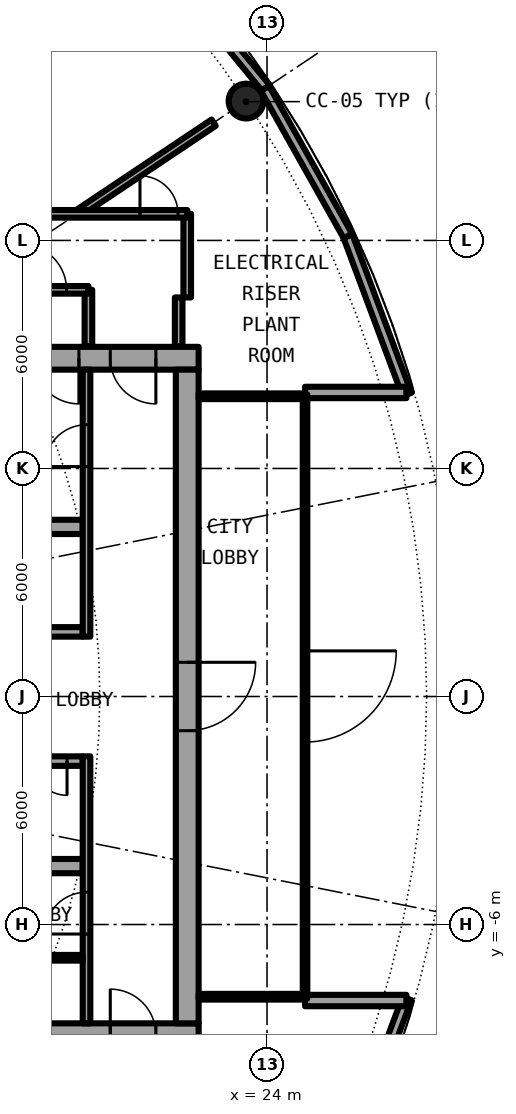
"""IFC4 building model, lengths in metres.
Left out: names, types, materials, properties, quantities, classifications, styles, units other than length and angle.
Written with IfcOpenShell. Run it as: python <this file> out.ifc"""

import sys

from ifc_helpers import new_model, si_unit, direction, frame, frame_2d, origin, origin_2d, place, context, subcontext, project, spatial, rectangle, hollow_circle, extrude, element, fill, save


model = new_model("IFC4")
c1 = context("Model", 3, precision=1e-05, world=origin(), true_north=direction((0.0, 1.0)))
c2 = subcontext(c1, "Body", "Model", "MODEL_VIEW")
j1 = project(units=[si_unit("LENGTHUNIT", "METRE"), si_unit("PLANEANGLEUNIT", "RADIAN")], contexts=[c1])
p1 = place(None, origin())
s1 = spatial("IfcSite", under=j1, at=p1, CompositionType="ELEMENT")
p2 = place(p1, origin())
s2 = spatial("IfcBuilding", under=s1, at=p2, CompositionType="ELEMENT")
p3 = place(p2, frame((0.0, 0.0, 103.25)))
s3 = spatial("IfcBuildingStorey", under=s2, at=p3, CompositionType="ELEMENT", Elevation=103.25)
p4 = place(p3, frame((23.448, 15.667, 0.0), z_axis=(0.0, 0.0, 1.0), x_axis=(1.0, 0.0, 0.0)))
e1 = element("IfcColumn", 1, at=p4, inside=s3, PredefinedType="COLUMN", context=c2, shape_type="SweptSolid", body=[
    extrude(hollow_circle(Radius=0.457, WallThickness=0.04, at=origin_2d()), origin(), (0.0, 0.0, 1.0), 4.2),
])
p5 = place(p3, frame((23.967, 16.014, 0.0), z_axis=(0.0, 0.0, 1.0), x_axis=(-0.634403999748, 0.773001659186, 0.0)))
e2 = element("IfcWall", 2, at=p5, inside=s3, PredefinedType="SOLIDWALL", context=c2, shape_type="SweptSolid", body=[
    extrude(rectangle(XDim=5.651, YDim=0.25, at=frame_2d((2.825, 0.0))), origin(), (0.0, 0.0, 1.0), 3.85),
])
p6 = place(p3, frame((27.682, 7.945, 0.0), z_axis=(0.0, 0.0, 1.0), x_axis=(-0.349247811493, 0.937030397675, 0.0)))
e3 = element("IfcWall", 3, at=p6, inside=s3, PredefinedType="SOLIDWALL", context=c2, shape_type="SweptSolid", body=[
    extrude(rectangle(XDim=4.452, YDim=0.25, at=frame_2d((2.226, 0.0))), origin(), (0.0, 0.0, 1.0), 3.85),
])
p7 = place(p3, frame((26.127, 12.117, 0.0), z_axis=(0.0, 0.0, 1.0), x_axis=(-0.489696356642, 0.871893042919, 0.0)))
e4 = element("IfcWall", 4, at=p7, inside=s3, PredefinedType="SOLIDWALL", context=c2, shape_type="SweptSolid", body=[
    extrude(rectangle(XDim=4.454, YDim=0.25, at=frame_2d((2.227, 0.0))), origin(), (0.0, 0.0, 1.0), 3.85),
])
p8 = place(p3, frame((26.127, -12.117, 0.0), z_axis=(0.0, 0.0, 1.0), x_axis=(0.349247811493, 0.937030397675, 0.0)))
e5 = element("IfcWall", 5, at=p8, inside=s3, PredefinedType="SOLIDWALL", context=c2, shape_type="SweptSolid", body=[
    extrude(rectangle(XDim=4.452, YDim=0.25, at=frame_2d((2.226, 0.0))), origin(), (0.0, 0.0, 1.0), 3.85),
])
for number, where, z_axis, x_axis in (
    (6, (25.0, 8.0, 0.0), (0.0, 0.0, 1.0), (1.0, 0.0, 0.0)),
    (7, (25.0, -8.0, 0.0), (0.0, 0.0, 1.0), (1.0, 0.0, 0.0)),
):
    element("IfcWall", number, at=place(p3, frame(where, z_axis=z_axis, x_axis=x_axis)), inside=s3, PredefinedType="SOLIDWALL", context=c2, shape_type="SweptSolid", body=[
        extrude(rectangle(XDim=2.667, YDim=0.3, at=frame_2d((1.333, 0.0))), origin(), (0.0, 0.0, 1.0), 3.85),
    ])
p9 = place(p3, frame((22.2, 8.9, 0.0), z_axis=(0.0, 0.0, 1.0), x_axis=(-1.0, 0.0, 0.0)))
e8 = element("IfcWall", 8, at=p9, inside=s3, PredefinedType="SHEAR", context=c2, shape_type="SweptSolid", body=[
    extrude(rectangle(XDim=13.8, YDim=0.6, at=frame_2d((6.9, 0.0))), origin(), (0.0, 0.0, 1.0), 4.2),
])
p10 = place(p9, frame((1.125, 0.0, 0.0)))
e9 = element("IfcOpeningElement", 9, at=p10, cuts=e8, PredefinedType="OPENING", context=c2, shape_type="SweptSolid", body=[
    extrude(rectangle(XDim=1.2, YDim=2.3, at=frame_2d((0.6, 1.15))), frame((0.0, 0.31, 0.0), z_axis=(0.0, -1.0, 0.0), x_axis=(1.0, 0.0, 0.0)), (0.0, 0.0, 1.0), 0.62),
])
p11 = place(p9, frame((3.15, 0.0, 0.0)))
e10 = element("IfcOpeningElement", 10, at=p11, cuts=e8, PredefinedType="OPENING", context=c2, shape_type="SweptSolid", body=[
    extrude(rectangle(XDim=1.2, YDim=2.3, at=frame_2d((0.6, 1.15))), frame((0.0, 0.31, 0.0), z_axis=(0.0, -1.0, 0.0), x_axis=(1.0, 0.0, 0.0)), (0.0, 0.0, 1.0), 0.62),
])
p12 = place(p3, frame((8.4, -8.9, 0.0), z_axis=(0.0, 0.0, 1.0), x_axis=(1.0, 0.0, 0.0)))
e11 = element("IfcWall", 11, at=p12, inside=s3, PredefinedType="SHEAR", context=c2, shape_type="SweptSolid", body=[
    extrude(rectangle(XDim=13.8, YDim=0.6, at=frame_2d((6.9, 0.0))), origin(), (0.0, 0.0, 1.0), 4.2),
])
p13 = place(p12, frame((11.475, 0.0, 0.0)))
e12 = element("IfcOpeningElement", 12, at=p13, cuts=e11, PredefinedType="OPENING", context=c2, shape_type="SweptSolid", body=[
    extrude(rectangle(XDim=1.2, YDim=2.3, at=frame_2d((0.6, 1.15))), frame((0.0, 0.31, 0.0), z_axis=(0.0, -1.0, 0.0), x_axis=(1.0, 0.0, 0.0)), (0.0, 0.0, 1.0), 0.62),
])
p14 = place(p3, frame((21.9, 8.6, 0.0), z_axis=(0.0, 0.0, 1.0), x_axis=(0.0, -1.0, 0.0)))
e13 = element("IfcWall", 13, at=p14, inside=s3, PredefinedType="SHEAR", context=c2, shape_type="SweptSolid", body=[
    extrude(rectangle(XDim=17.2, YDim=0.6, at=frame_2d((8.6, 0.0))), origin(), (0.0, 0.0, 1.0), 4.2),
])
p15 = place(p14, frame((7.7, 0.0, 0.0)))
e14 = element("IfcOpeningElement", 14, at=p15, cuts=e13, PredefinedType="OPENING", context=c2, shape_type="SweptSolid", body=[
    extrude(rectangle(XDim=1.8, YDim=2.3, at=frame_2d((0.9, 1.15))), frame((0.0, 0.31, 0.0), z_axis=(0.0, -1.0, 0.0), x_axis=(1.0, 0.0, 0.0)), (0.0, 0.0, 1.0), 0.62),
])
p16 = place(p3, frame((9.0, 1.7, 0.0), z_axis=(0.0, 0.0, 1.0), x_axis=(1.0, 0.0, 0.0)))
e15 = element("IfcWall", 15, at=p16, inside=s3, PredefinedType="SHEAR", context=c2, shape_type="SweptSolid", body=[
    extrude(rectangle(XDim=10.15, YDim=0.25, at=frame_2d((5.075, 0.0))), origin(), (0.0, 0.0, 1.0), 4.2),
])
p17 = place(p16, frame((0.387, 0.0, 0.0)))
e16 = element("IfcOpeningElement", 16, at=p17, cuts=e15, PredefinedType="OPENING", context=c2, shape_type="SweptSolid", body=[
    extrude(rectangle(XDim=1.1, YDim=2.3, at=frame_2d((0.55, 1.15))), frame((0.0, 0.135, 0.0), z_axis=(0.0, -1.0, 0.0), x_axis=(1.0, 0.0, 0.0)), (0.0, 0.0, 1.0), 0.27),
])
p18 = place(p16, frame((2.45, 0.0, 0.0)))
e17 = element("IfcOpeningElement", 17, at=p18, cuts=e15, PredefinedType="OPENING", context=c2, shape_type="SweptSolid", body=[
    extrude(rectangle(XDim=1.1, YDim=2.3, at=frame_2d((0.55, 1.15))), frame((0.0, 0.135, 0.0), z_axis=(0.0, -1.0, 0.0), x_axis=(1.0, 0.0, 0.0)), (0.0, 0.0, 1.0), 0.27),
])
p19 = place(p16, frame((4.45, 0.0, 0.0)))
e18 = element("IfcOpeningElement", 18, at=p19, cuts=e15, PredefinedType="OPENING", context=c2, shape_type="SweptSolid", body=[
    extrude(rectangle(XDim=1.1, YDim=2.3, at=frame_2d((0.55, 1.15))), frame((0.0, 0.135, 0.0), z_axis=(0.0, -1.0, 0.0), x_axis=(1.0, 0.0, 0.0)), (0.0, 0.0, 1.0), 0.27),
])
p20 = place(p3, frame((9.0, 4.462, 0.0), z_axis=(0.0, 0.0, 1.0), x_axis=(1.0, 0.0, 0.0)))
e19 = element("IfcWall", 19, at=p20, inside=s3, PredefinedType="SHEAR", context=c2, shape_type="SweptSolid", body=[
    extrude(rectangle(XDim=10.15, YDim=0.375, at=frame_2d((5.075, 0.0))), origin(), (0.0, 0.0, 1.0), 4.2),
])
p21 = place(p20, frame((6.6, 0.0, 0.0)))
e20 = element("IfcOpeningElement", 20, at=p21, cuts=e19, PredefinedType="OPENING", context=c2, shape_type="SweptSolid", body=[
    extrude(rectangle(XDim=1.1, YDim=2.3, at=frame_2d((0.55, 1.15))), frame((0.0, 0.198, 0.0), z_axis=(0.0, -1.0, 0.0), x_axis=(1.0, 0.0, 0.0)), (0.0, 0.0, 1.0), 0.395),
])
p22 = place(p3, frame((19.25, 1.575, 0.0), z_axis=(0.0, 0.0, 1.0), x_axis=(0.0, 1.0, 0.0)))
e21 = element("IfcWall", 21, at=p22, inside=s3, PredefinedType="SOLIDWALL", context=c2, shape_type="SweptSolid", body=[
    extrude(rectangle(XDim=7.025, YDim=0.2, at=frame_2d((3.513, 0.0))), origin(), (0.0, 0.0, 1.0), 3.85),
])
p23 = place(p22, frame((4.475, 0.0, 0.0)))
e22 = element("IfcOpeningElement", 22, at=p23, cuts=e21, PredefinedType="OPENING", context=c2, shape_type="SweptSolid", body=[
    extrude(rectangle(XDim=1.1, YDim=2.3, at=frame_2d((0.55, 1.15))), frame((0.0, 0.11, 0.0), z_axis=(0.0, -1.0, 0.0), x_axis=(1.0, 0.0, 0.0)), (0.0, 0.0, 1.0), 0.22),
])
p24 = place(p3, frame((19.15, -1.7, 0.0), z_axis=(0.0, 0.0, 1.0), x_axis=(-1.0, 0.0, 0.0)))
e23 = element("IfcWall", 23, at=p24, inside=s3, PredefinedType="SHEAR", context=c2, shape_type="SweptSolid", body=[
    extrude(rectangle(XDim=10.15, YDim=0.25, at=frame_2d((5.075, 0.0))), origin(), (0.0, 0.0, 1.0), 4.2),
])
p25 = place(p24, frame((2.45, 0.0, 0.0)))
e24 = element("IfcOpeningElement", 24, at=p25, cuts=e23, PredefinedType="OPENING", context=c2, shape_type="SweptSolid", body=[
    extrude(rectangle(XDim=1.1, YDim=2.3, at=frame_2d((0.55, 1.15))), frame((0.0, 0.135, 0.0), z_axis=(0.0, -1.0, 0.0), x_axis=(1.0, 0.0, 0.0)), (0.0, 0.0, 1.0), 0.27),
])
p26 = place(p24, frame((6.762, 0.0, 0.0)))
e25 = element("IfcOpeningElement", 25, at=p26, cuts=e23, PredefinedType="OPENING", context=c2, shape_type="SweptSolid", body=[
    extrude(rectangle(XDim=0.9, YDim=2.3, at=frame_2d((0.45, 1.15))), frame((0.0, 0.135, 0.0), z_axis=(0.0, -1.0, 0.0), x_axis=(1.0, 0.0, 0.0)), (0.0, 0.0, 1.0), 0.27),
])
p27 = place(p24, frame((0.413, 0.0, 0.0)))
e26 = element("IfcOpeningElement", 26, at=p27, cuts=e23, PredefinedType="OPENING", context=c2, shape_type="SweptSolid", body=[
    extrude(rectangle(XDim=0.9, YDim=2.3, at=frame_2d((0.45, 1.15))), frame((0.0, 0.135, 0.0), z_axis=(0.0, -1.0, 0.0), x_axis=(1.0, 0.0, 0.0)), (0.0, 0.0, 1.0), 0.27),
])
p28 = place(p3, frame((9.0, -4.462, 0.0), z_axis=(0.0, 0.0, 1.0), x_axis=(1.0, 0.0, 0.0)))
e27 = element("IfcWall", 27, at=p28, inside=s3, PredefinedType="SHEAR", context=c2, shape_type="SweptSolid", body=[
    extrude(rectangle(XDim=10.15, YDim=0.375, at=frame_2d((5.075, 0.0))), origin(), (0.0, 0.0, 1.0), 4.2),
])
p29 = place(p3, frame((19.25, -8.6, 0.0), z_axis=(0.0, 0.0, 1.0), x_axis=(0.0, 1.0, 0.0)))
e28 = element("IfcWall", 28, at=p29, inside=s3, PredefinedType="SOLIDWALL", context=c2, shape_type="SweptSolid", body=[
    extrude(rectangle(XDim=7.025, YDim=0.2, at=frame_2d((3.513, 0.0))), origin(), (0.0, 0.0, 1.0), 3.85),
])
p30 = place(p29, frame((2.35, 0.0, 0.0)))
e29 = element("IfcOpeningElement", 29, at=p30, cuts=e28, PredefinedType="OPENING", context=c2, shape_type="SweptSolid", body=[
    extrude(rectangle(XDim=1.1, YDim=2.3, at=frame_2d((0.55, 1.15))), frame((0.0, 0.11, 0.0), z_axis=(0.0, -1.0, 0.0), x_axis=(1.0, 0.0, 0.0)), (0.0, 0.0, 1.0), 0.22),
])
p31 = place(p3, frame((15.45, -6.875, 0.0), z_axis=(0.0, 0.0, 1.0), x_axis=(1.0, 0.0, 0.0)))
e30 = element("IfcWall", 30, at=p31, inside=s3, PredefinedType="PARTITIONING", context=c2, shape_type="SweptSolid", body=[
    extrude(rectangle(XDim=3.7, YDim=0.15, at=frame_2d((1.85, 0.0))), origin(), (0.0, 0.0, 1.0), 3.85),
])
p32 = place(p31, frame((1.4, 0.0, 0.0)))
e31 = element("IfcOpeningElement", 31, at=p32, cuts=e30, PredefinedType="OPENING", context=c2, shape_type="SweptSolid", body=[
    extrude(rectangle(XDim=0.9, YDim=2.3, at=frame_2d((0.45, 1.15))), frame((0.0, 0.085, 0.0), z_axis=(0.0, -1.0, 0.0), x_axis=(1.0, 0.0, 0.0)), (0.0, 0.0, 1.0), 0.17),
])
for number, where, z_axis, x_axis in (
    (32, (22.2, -7.9, 0.0), (0.0, 0.0, 1.0), (1.0, 0.0, 0.0)),
    (33, (22.2, 7.9, 0.0), (0.0, 0.0, 1.0), (1.0, 0.0, 0.0)),
):
    element("IfcWall", number, at=place(p3, frame(where, z_axis=z_axis, x_axis=x_axis)), inside=s3, PredefinedType="PARTITIONING", context=c2, shape_type="SweptSolid", body=[
        extrude(rectangle(XDim=2.74, YDim=0.15, at=frame_2d((1.37, 0.0))), origin(), (0.0, 0.0, 1.0), 3.85),
    ])
p33 = place(p3, frame((25.0, 7.95, 0.0), z_axis=(0.0, 0.0, 1.0), x_axis=(0.0, -1.0, 0.0)))
e34 = element("IfcWall", 34, at=p33, inside=s3, PredefinedType="PARTITIONING", context=c2, shape_type="SweptSolid", body=[
    extrude(rectangle(XDim=15.9, YDim=0.12, at=frame_2d((7.95, 0.0))), origin(), (0.0, 0.0, 1.0), 3.85),
])
p34 = place(p33, frame((6.75, 0.0, 0.0)))
e35 = element("IfcOpeningElement", 35, at=p34, cuts=e34, PredefinedType="OPENING", context=c2, shape_type="SweptSolid", body=[
    extrude(rectangle(XDim=2.4, YDim=2.3, at=frame_2d((1.2, 1.15))), frame((0.0, 0.07, 0.0), z_axis=(0.0, -1.0, 0.0), x_axis=(1.0, 0.0, 0.0)), (0.0, 0.0, 1.0), 0.14),
])
p35 = place(p33, frame((11.55, 0.0, 0.1)))
e36 = element("IfcOpeningElement", 36, at=p35, cuts=e34, PredefinedType="OPENING", context=c2, shape_type="SweptSolid", body=[
    extrude(rectangle(XDim=3.4, YDim=3.5, at=frame_2d((1.7, 1.75))), frame((0.0, 0.07, 0.0), z_axis=(0.0, -1.0, 0.0), x_axis=(1.0, 0.0, 0.0)), (0.0, 0.0, 1.0), 0.14),
])
p36 = place(p33, frame((0.95, 0.0, 0.1)))
e37 = element("IfcOpeningElement", 37, at=p36, cuts=e34, PredefinedType="OPENING", context=c2, shape_type="SweptSolid", body=[
    extrude(rectangle(XDim=3.4, YDim=3.5, at=frame_2d((1.7, 1.75))), frame((0.0, 0.07, 0.0), z_axis=(0.0, -1.0, 0.0), x_axis=(1.0, 0.0, 0.0)), (0.0, 0.0, 1.0), 0.14),
])
p37 = place(p3, frame((21.9, 10.5, 0.0), z_axis=(0.0, 0.0, 1.0), x_axis=(0.0, 1.0, 0.0)))
e38 = element("IfcWall", 38, at=p37, inside=s3, PredefinedType="PARTITIONING", context=c2, shape_type="SweptSolid", body=[
    extrude(rectangle(XDim=2.2, YDim=0.2, at=frame_2d((1.1, 0.0))), origin(), (0.0, 0.0, 1.0), 3.85),
])
p38 = place(p3, frame((21.675, 9.22, 0.0), z_axis=(0.0, 0.0, 1.0), x_axis=(0.0, 1.0, 0.0)))
e39 = element("IfcWall", 39, at=p38, inside=s3, PredefinedType="PARTITIONING", context=c2, shape_type="SweptSolid", body=[
    extrude(rectangle(XDim=1.28, YDim=0.2, at=frame_2d((0.64, 0.0))), origin(), (0.0, 0.0, 1.0), 3.85),
])
p39 = place(p3, frame((19.3, 9.22, 0.0), z_axis=(0.0, 0.0, 1.0), x_axis=(0.0, 1.0, 0.0)))
e40 = element("IfcWall", 40, at=p39, inside=s3, PredefinedType="PARTITIONING", context=c2, shape_type="SweptSolid", body=[
    extrude(rectangle(XDim=1.48, YDim=0.2, at=frame_2d((0.74, 0.0))), origin(), (0.0, 0.0, 1.0), 3.85),
])
p40 = place(p3, frame((19.007, 12.7, 0.0), z_axis=(0.0, 0.0, 1.0), x_axis=(0.831405664754, 0.555665925368, 0.0)))
e41 = element("IfcWall", 41, at=p40, inside=s3, PredefinedType="PARTITIONING", context=c2, shape_type="SweptSolid", body=[
    extrude(rectangle(XDim=4.315, YDim=0.2, at=frame_2d((2.158, 0.0))), origin(), (0.0, 0.0, 1.0), 3.85),
])
p41 = place(p3, frame((16.95, 10.7, 0.0), z_axis=(0.0, 0.0, 1.0), x_axis=(1.0, 0.0, 0.0)))
e42 = element("IfcWall", 42, at=p41, inside=s3, PredefinedType="PARTITIONING", context=c2, shape_type="SweptSolid", body=[
    extrude(rectangle(XDim=2.35, YDim=0.2, at=frame_2d((1.175, 0.0))), origin(), (0.0, 0.0, 1.0), 3.85),
])
p42 = place(p41, frame((0.575, 0.0, 0.0)))
e43 = element("IfcOpeningElement", 43, at=p42, cuts=e42, PredefinedType="OPENING", context=c2, shape_type="SweptSolid", body=[
    extrude(rectangle(XDim=1.2, YDim=2.3, at=frame_2d((0.6, 1.15))), frame((0.0, 0.11, 0.0), z_axis=(0.0, -1.0, 0.0), x_axis=(1.0, 0.0, 0.0)), (0.0, 0.0, 1.0), 0.22),
])
p43 = place(p3, frame((14.735, 12.7, 0.0), z_axis=(0.0, 0.0, 1.0), x_axis=(1.0, 0.0, 0.0)))
e44 = element("IfcWall", 44, at=p43, inside=s3, PredefinedType="PARTITIONING", context=c2, shape_type="SweptSolid", body=[
    extrude(rectangle(XDim=7.165, YDim=0.2, at=frame_2d((3.583, 0.0))), origin(), (0.0, 0.0, 1.0), 3.85),
])
p44 = place(p43, frame((5.922, 0.0, 0.0)))
e45 = element("IfcOpeningElement", 45, at=p44, cuts=e44, PredefinedType="OPENING", context=c2, shape_type="SweptSolid", body=[
    extrude(rectangle(XDim=1.0, YDim=2.3, at=frame_2d((0.5, 1.15))), frame((0.0, 0.11, 0.0), z_axis=(0.0, -1.0, 0.0), x_axis=(1.0, 0.0, 0.0)), (0.0, 0.0, 1.0), 0.22),
])
p45 = place(p27, origin())
e46 = element("IfcDoor", 46, at=p45, inside=s3, OperationType="SINGLE_SWING_RIGHT", PredefinedType="DOOR", context=c2, shape_type="SweptSolid", body=[
    extrude(rectangle(XDim=0.9, YDim=2.3, at=frame_2d((0.45, 1.15))), frame((0.0, 0.025, 0.0), z_axis=(0.0, -1.0, 0.0), x_axis=(1.0, 0.0, 0.0)), (0.0, 0.0, 1.0), 0.05),
])
fill(e26, e46)
p46 = place(p23, origin())
e47 = element("IfcDoor", 47, at=p46, inside=s3, OperationType="SINGLE_SWING_LEFT", PredefinedType="DOOR", context=c2, shape_type="SweptSolid", body=[
    extrude(rectangle(XDim=1.1, YDim=2.3, at=frame_2d((0.55, 1.15))), frame((0.0, 0.025, 0.0), z_axis=(0.0, -1.0, 0.0), x_axis=(1.0, 0.0, 0.0)), (0.0, 0.0, 1.0), 0.05),
])
fill(e22, e47)
p47 = place(p30, origin())
e48 = element("IfcDoor", 48, at=p47, inside=s3, OperationType="SINGLE_SWING_RIGHT", PredefinedType="DOOR", context=c2, shape_type="SweptSolid", body=[
    extrude(rectangle(XDim=1.1, YDim=2.3, at=frame_2d((0.55, 1.15))), frame((0.0, 0.025, 0.0), z_axis=(0.0, -1.0, 0.0), x_axis=(1.0, 0.0, 0.0)), (0.0, 0.0, 1.0), 0.05),
])
fill(e29, e48)
p48 = place(p10, origin())
e49 = element("IfcDoor", 49, at=p48, inside=s3, OperationType="SINGLE_SWING_RIGHT", PredefinedType="DOOR", context=c2, shape_type="SweptSolid", body=[
    extrude(rectangle(XDim=1.2, YDim=2.3, at=frame_2d((0.6, 1.15))), frame((0.0, 0.025, 0.0), z_axis=(0.0, -1.0, 0.0), x_axis=(1.0, 0.0, 0.0)), (0.0, 0.0, 1.0), 0.05),
])
fill(e9, e49)
p49 = place(p13, origin())
e50 = element("IfcDoor", 50, at=p49, inside=s3, OperationType="SINGLE_SWING_LEFT", PredefinedType="DOOR", context=c2, shape_type="SweptSolid", body=[
    extrude(rectangle(XDim=1.2, YDim=2.3, at=frame_2d((0.6, 1.15))), frame((0.0, 0.025, 0.0), z_axis=(0.0, -1.0, 0.0), x_axis=(1.0, 0.0, 0.0)), (0.0, 0.0, 1.0), 0.05),
])
fill(e12, e50)
p50 = place(p11, origin())
e51 = element("IfcDoor", 51, at=p50, inside=s3, OperationType="SINGLE_SWING_RIGHT", PredefinedType="DOOR", context=c2, shape_type="SweptSolid", body=[
    extrude(rectangle(XDim=1.2, YDim=2.3, at=frame_2d((0.6, 1.15))), frame((0.0, 0.025, 0.0), z_axis=(0.0, -1.0, 0.0), x_axis=(1.0, 0.0, 0.0)), (0.0, 0.0, 1.0), 0.05),
])
fill(e10, e51)
p51 = place(p15, origin())
e52 = element("IfcDoor", 52, at=p51, inside=s3, OperationType="SINGLE_SWING_LEFT", PredefinedType="DOOR", context=c2, shape_type="SweptSolid", body=[
    extrude(rectangle(XDim=1.8, YDim=2.3, at=frame_2d((0.9, 1.15))), frame((0.0, 0.025, 0.0), z_axis=(0.0, -1.0, 0.0), x_axis=(1.0, 0.0, 0.0)), (0.0, 0.0, 1.0), 0.05),
])
fill(e14, e52)
p52 = place(p34, origin())
e53 = element("IfcDoor", 53, at=p52, inside=s3, OperationType="SINGLE_SWING_LEFT", PredefinedType="DOOR", context=c2, shape_type="SweptSolid", body=[
    extrude(rectangle(XDim=2.4, YDim=2.3, at=frame_2d((1.2, 1.15))), frame((0.0, 0.025, 0.0), z_axis=(0.0, -1.0, 0.0), x_axis=(1.0, 0.0, 0.0)), (0.0, 0.0, 1.0), 0.05),
])
fill(e35, e53)
p53 = place(p35, origin())
e54 = element("IfcWindow", 54, at=p53, inside=s3, PartitioningType="SINGLE_PANEL", PredefinedType="WINDOW", context=c2, shape_type="SweptSolid", body=[
    extrude(rectangle(XDim=3.4, YDim=3.5, at=frame_2d((1.7, 1.75))), frame((0.0, 0.03, 0.0), z_axis=(0.0, -1.0, 0.0), x_axis=(1.0, 0.0, 0.0)), (0.0, 0.0, 1.0), 0.06),
])
fill(e36, e54)
p54 = place(p36, origin())
e55 = element("IfcWindow", 55, at=p54, inside=s3, PartitioningType="SINGLE_PANEL", PredefinedType="WINDOW", context=c2, shape_type="SweptSolid", body=[
    extrude(rectangle(XDim=3.4, YDim=3.5, at=frame_2d((1.7, 1.75))), frame((0.0, 0.03, 0.0), z_axis=(0.0, -1.0, 0.0), x_axis=(1.0, 0.0, 0.0)), (0.0, 0.0, 1.0), 0.06),
])
fill(e37, e55)
p55 = place(p42, origin())
e56 = element("IfcDoor", 56, at=p55, inside=s3, OperationType="SINGLE_SWING_LEFT", PredefinedType="DOOR", context=c2, shape_type="SweptSolid", body=[
    extrude(rectangle(XDim=1.2, YDim=2.3, at=frame_2d((0.6, 1.15))), frame((0.0, 0.025, 0.0), z_axis=(0.0, -1.0, 0.0), x_axis=(1.0, 0.0, 0.0)), (0.0, 0.0, 1.0), 0.05),
])
fill(e43, e56)
p56 = place(p44, origin())
e57 = element("IfcDoor", 57, at=p56, inside=s3, OperationType="SINGLE_SWING_RIGHT", PredefinedType="DOOR", context=c2, shape_type="SweptSolid", body=[
    extrude(rectangle(XDim=1.0, YDim=2.3, at=frame_2d((0.5, 1.15))), frame((0.0, 0.025, 0.0), z_axis=(0.0, -1.0, 0.0), x_axis=(1.0, 0.0, 0.0)), (0.0, 0.0, 1.0), 0.05),
])
fill(e45, e57)
save(model, sys.argv[1])
